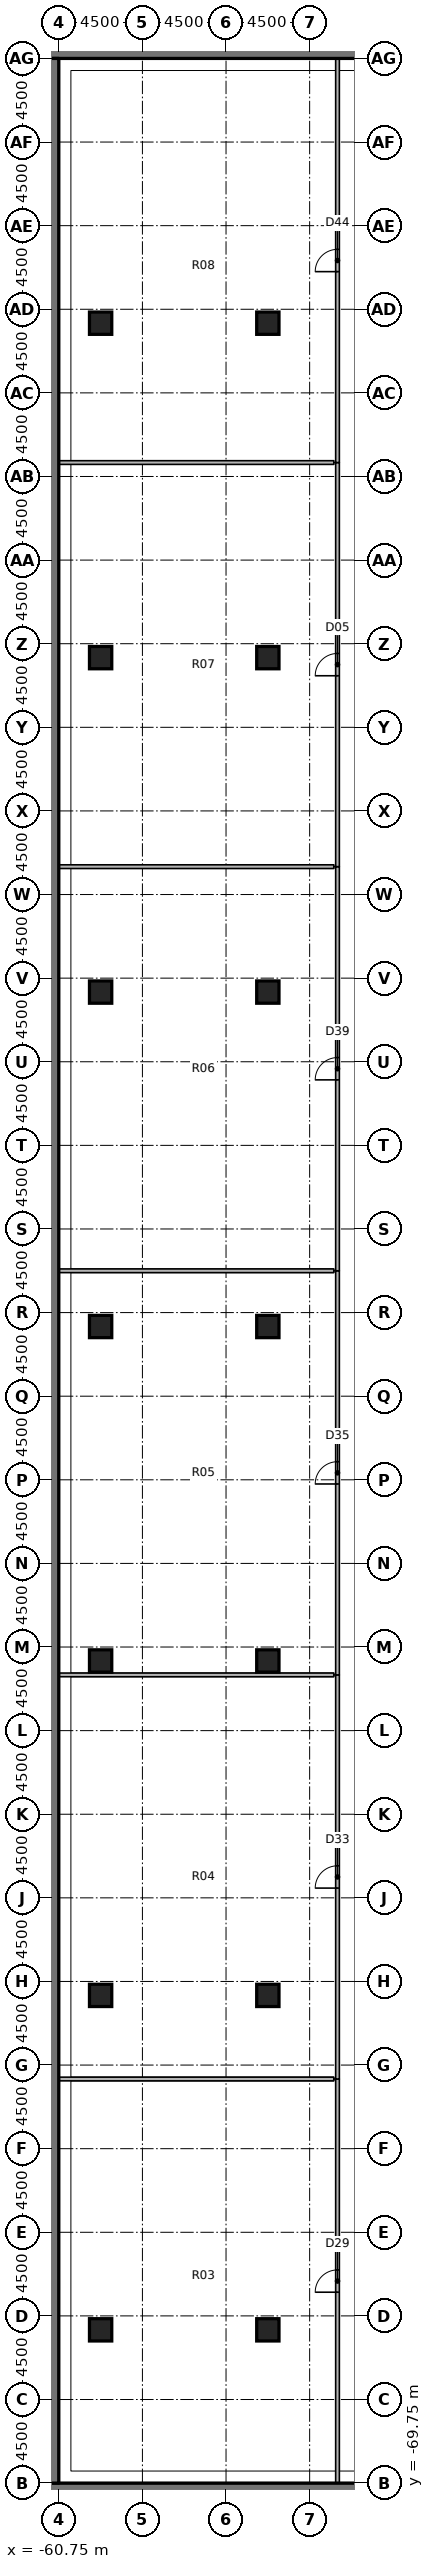
"""IFC4 building model, lengths in metres.
Left out: names, types, materials, properties, quantities, classifications, styles, units other than length and angle.
Written with IfcOpenShell. Run it as: python <this file> out.ifc"""

import sys

from ifc_helpers import new_model, si_unit, direction, frame, frame_2d, origin, origin_2d, place, context, subcontext, project, spatial, rectangle, extrude, element, fill, save


model = new_model("IFC4")
c1 = context("Model", 3, precision=1e-05, world=origin(), true_north=direction((0.0, 1.0)))
c2 = subcontext(c1, "Body", "Model", "MODEL_VIEW")
j1 = project(units=[si_unit("LENGTHUNIT", "METRE"), si_unit("PLANEANGLEUNIT", "RADIAN")], contexts=[c1])
p1 = place(None, origin())
s1 = spatial("IfcSite", under=j1, at=p1, CompositionType="ELEMENT")
p2 = place(p1, origin())
s2 = spatial("IfcBuilding", under=s1, at=p2, CompositionType="ELEMENT")
p3 = place(p2, frame((0.0, 0.0, -4.0)))
s3 = spatial("IfcBuildingStorey", under=s2, at=p3, CompositionType="ELEMENT", Elevation=-4.0)
for number, where, z_axis, x_axis in (
    (1, (-58.5, -61.5, 0.0), (0.0, 0.0, 1.0), (1.0, 0.0, 0.0)),
    (2, (-58.5, -43.5, 0.0), (0.0, 0.0, 1.0), (1.0, 0.0, 0.0)),
    (3, (-58.5, -25.5, 0.0), (0.0, 0.0, 1.0), (1.0, 0.0, 0.0)),
    (4, (-58.5, -7.5, 0.0), (0.0, 0.0, 1.0), (1.0, 0.0, 0.0)),
    (5, (-58.5, 10.5, 0.0), (0.0, 0.0, 1.0), (1.0, 0.0, 0.0)),
    (6, (-58.5, 28.5, 0.0), (0.0, 0.0, 1.0), (1.0, 0.0, 0.0)),
    (7, (-58.5, 46.5, 0.0), (0.0, 0.0, 1.0), (1.0, 0.0, 0.0)),
    (8, (-49.5, -61.5, 0.0), (0.0, 0.0, 1.0), (1.0, 0.0, 0.0)),
    (9, (-49.5, -43.5, 0.0), (0.0, 0.0, 1.0), (1.0, 0.0, 0.0)),
    (10, (-49.5, -25.5, 0.0), (0.0, 0.0, 1.0), (1.0, 0.0, 0.0)),
    (11, (-49.5, -7.5, 0.0), (0.0, 0.0, 1.0), (1.0, 0.0, 0.0)),
    (12, (-49.5, 10.5, 0.0), (0.0, 0.0, 1.0), (1.0, 0.0, 0.0)),
    (13, (-49.5, 28.5, 0.0), (0.0, 0.0, 1.0), (1.0, 0.0, 0.0)),
    (14, (-49.5, 46.5, 0.0), (0.0, 0.0, 1.0), (1.0, 0.0, 0.0)),
):
    element("IfcColumn", number, at=place(p3, frame(where, z_axis=z_axis, x_axis=x_axis)), inside=s3, PredefinedType="COLUMN", context=c2, shape_type="SweptSolid", body=[
        extrude(rectangle(XDim=1.2, YDim=1.2, at=origin_2d()), origin(), (0.0, 0.0, 1.0), 3.1),
    ])
for number, where, z_axis, x_axis in (
    (15, (-61.25, -70.0, 0.0), (0.0, 0.0, 1.0), (1.0, 0.0, 0.0)),
    (16, (-61.25, 61.0, 0.0), (0.0, 0.0, 1.0), (1.0, 0.0, 0.0)),
):
    element("IfcWall", number, at=place(p3, frame(where, z_axis=z_axis, x_axis=x_axis)), inside=s3, PredefinedType="SOLIDWALL", context=c2, shape_type="SweptSolid", body=[
        extrude(rectangle(XDim=122.5, YDim=0.5, at=frame_2d((61.25, 0.0))), origin(), (0.0, 0.0, 1.0), 4.0),
    ])
p4 = place(p3, frame((-61.0, -69.75, 0.0), z_axis=(0.0, 0.0, 1.0), x_axis=(0.0, 1.0, 0.0)))
e17 = element("IfcWall", 17, at=p4, inside=s3, PredefinedType="SOLIDWALL", context=c2, shape_type="SweptSolid", body=[
    extrude(rectangle(XDim=130.5, YDim=0.5, at=frame_2d((65.25, 0.0))), origin(), (0.0, 0.0, 1.0), 4.0),
])
p5 = place(p3, frame((-45.75, -69.75, 0.0), z_axis=(0.0, 0.0, 1.0), x_axis=(0.0, 1.0, 0.0)))
e18 = element("IfcWall", 18, at=p5, inside=s3, PredefinedType="PARTITIONING", context=c2, shape_type="SweptSolid", body=[
    extrude(rectangle(XDim=21.75, YDim=0.2, at=frame_2d((10.875, 0.0))), origin(), (0.0, 0.0, 1.0), 3.1),
])
p6 = place(p5, frame((10.275, 0.0, 0.0)))
e19 = element("IfcOpeningElement", 19, at=p6, cuts=e18, PredefinedType="OPENING", context=c2, shape_type="SweptSolid", body=[
    extrude(rectangle(XDim=1.2, YDim=2.1, at=frame_2d((0.6, 1.05))), frame((0.0, 0.11, 0.0), z_axis=(0.0, -1.0, 0.0), x_axis=(1.0, 0.0, 0.0)), (0.0, 0.0, 1.0), 0.22),
])
p7 = place(p3, frame((-45.75, -48.0, 0.0), z_axis=(0.0, 0.0, 1.0), x_axis=(0.0, 1.0, 0.0)))
e20 = element("IfcWall", 20, at=p7, inside=s3, PredefinedType="PARTITIONING", context=c2, shape_type="SweptSolid", body=[
    extrude(rectangle(XDim=21.75, YDim=0.2, at=frame_2d((10.875, 0.0))), origin(), (0.0, 0.0, 1.0), 3.1),
])
p8 = place(p7, frame((10.275, 0.0, 0.0)))
e21 = element("IfcOpeningElement", 21, at=p8, cuts=e20, PredefinedType="OPENING", context=c2, shape_type="SweptSolid", body=[
    extrude(rectangle(XDim=1.2, YDim=2.1, at=frame_2d((0.6, 1.05))), frame((0.0, 0.11, 0.0), z_axis=(0.0, -1.0, 0.0), x_axis=(1.0, 0.0, 0.0)), (0.0, 0.0, 1.0), 0.22),
])
p9 = place(p3, frame((-45.75, -26.25, 0.0), z_axis=(0.0, 0.0, 1.0), x_axis=(0.0, 1.0, 0.0)))
e22 = element("IfcWall", 22, at=p9, inside=s3, PredefinedType="PARTITIONING", context=c2, shape_type="SweptSolid", body=[
    extrude(rectangle(XDim=21.75, YDim=0.2, at=frame_2d((10.875, 0.0))), origin(), (0.0, 0.0, 1.0), 3.1),
])
p10 = place(p9, frame((10.275, 0.0, 0.0)))
e23 = element("IfcOpeningElement", 23, at=p10, cuts=e22, PredefinedType="OPENING", context=c2, shape_type="SweptSolid", body=[
    extrude(rectangle(XDim=1.2, YDim=2.1, at=frame_2d((0.6, 1.05))), frame((0.0, 0.11, 0.0), z_axis=(0.0, -1.0, 0.0), x_axis=(1.0, 0.0, 0.0)), (0.0, 0.0, 1.0), 0.22),
])
p11 = place(p3, frame((-45.75, -4.5, 0.0), z_axis=(0.0, 0.0, 1.0), x_axis=(0.0, 1.0, 0.0)))
e24 = element("IfcWall", 24, at=p11, inside=s3, PredefinedType="PARTITIONING", context=c2, shape_type="SweptSolid", body=[
    extrude(rectangle(XDim=21.75, YDim=0.2, at=frame_2d((10.875, 0.0))), origin(), (0.0, 0.0, 1.0), 3.1),
])
p12 = place(p11, frame((10.275, 0.0, 0.0)))
e25 = element("IfcOpeningElement", 25, at=p12, cuts=e24, PredefinedType="OPENING", context=c2, shape_type="SweptSolid", body=[
    extrude(rectangle(XDim=1.2, YDim=2.1, at=frame_2d((0.6, 1.05))), frame((0.0, 0.11, 0.0), z_axis=(0.0, -1.0, 0.0), x_axis=(1.0, 0.0, 0.0)), (0.0, 0.0, 1.0), 0.22),
])
p13 = place(p3, frame((-45.75, 17.25, 0.0), z_axis=(0.0, 0.0, 1.0), x_axis=(0.0, 1.0, 0.0)))
e26 = element("IfcWall", 26, at=p13, inside=s3, PredefinedType="PARTITIONING", context=c2, shape_type="SweptSolid", body=[
    extrude(rectangle(XDim=21.75, YDim=0.2, at=frame_2d((10.875, 0.0))), origin(), (0.0, 0.0, 1.0), 3.1),
])
p14 = place(p13, frame((10.275, 0.0, 0.0)))
e27 = element("IfcOpeningElement", 27, at=p14, cuts=e26, PredefinedType="OPENING", context=c2, shape_type="SweptSolid", body=[
    extrude(rectangle(XDim=1.2, YDim=2.1, at=frame_2d((0.6, 1.05))), frame((0.0, 0.11, 0.0), z_axis=(0.0, -1.0, 0.0), x_axis=(1.0, 0.0, 0.0)), (0.0, 0.0, 1.0), 0.22),
])
p15 = place(p3, frame((-45.75, 39.0, 0.0), z_axis=(0.0, 0.0, 1.0), x_axis=(0.0, 1.0, 0.0)))
e28 = element("IfcWall", 28, at=p15, inside=s3, PredefinedType="PARTITIONING", context=c2, shape_type="SweptSolid", body=[
    extrude(rectangle(XDim=21.75, YDim=0.2, at=frame_2d((10.875, 0.0))), origin(), (0.0, 0.0, 1.0), 3.1),
])
p16 = place(p15, frame((10.275, 0.0, 0.0)))
e29 = element("IfcOpeningElement", 29, at=p16, cuts=e28, PredefinedType="OPENING", context=c2, shape_type="SweptSolid", body=[
    extrude(rectangle(XDim=1.2, YDim=2.1, at=frame_2d((0.6, 1.05))), frame((0.0, 0.11, 0.0), z_axis=(0.0, -1.0, 0.0), x_axis=(1.0, 0.0, 0.0)), (0.0, 0.0, 1.0), 0.22),
])
for number, where, z_axis, x_axis in (
    (30, (-60.75, -48.0, 0.0), (0.0, 0.0, 1.0), (1.0, 0.0, 0.0)),
    (31, (-60.75, -26.25, 0.0), (0.0, 0.0, 1.0), (1.0, 0.0, 0.0)),
    (32, (-60.75, -4.5, 0.0), (0.0, 0.0, 1.0), (1.0, 0.0, 0.0)),
    (33, (-60.75, 17.25, 0.0), (0.0, 0.0, 1.0), (1.0, 0.0, 0.0)),
    (34, (-60.75, 39.0, 0.0), (0.0, 0.0, 1.0), (1.0, 0.0, 0.0)),
):
    element("IfcWall", number, at=place(p3, frame(where, z_axis=z_axis, x_axis=x_axis)), inside=s3, PredefinedType="PARTITIONING", context=c2, shape_type="SweptSolid", body=[
        extrude(rectangle(XDim=14.8, YDim=0.2, at=frame_2d((7.4, 0.0))), origin(), (0.0, 0.0, 1.0), 3.1),
    ])
p17 = place(p6, origin())
e35 = element("IfcDoor", 35, at=p17, inside=s3, OperationType="SINGLE_SWING_LEFT", PredefinedType="DOOR", context=c2, shape_type="SweptSolid", body=[
    extrude(rectangle(XDim=1.2, YDim=2.1, at=frame_2d((0.6, 1.05))), frame((0.0, 0.025, 0.0), z_axis=(0.0, -1.0, 0.0), x_axis=(1.0, 0.0, 0.0)), (0.0, 0.0, 1.0), 0.05),
])
fill(e19, e35)
p18 = place(p8, origin())
e36 = element("IfcDoor", 36, at=p18, inside=s3, OperationType="SINGLE_SWING_LEFT", PredefinedType="DOOR", context=c2, shape_type="SweptSolid", body=[
    extrude(rectangle(XDim=1.2, YDim=2.1, at=frame_2d((0.6, 1.05))), frame((0.0, 0.025, 0.0), z_axis=(0.0, -1.0, 0.0), x_axis=(1.0, 0.0, 0.0)), (0.0, 0.0, 1.0), 0.05),
])
fill(e21, e36)
p19 = place(p10, origin())
e37 = element("IfcDoor", 37, at=p19, inside=s3, OperationType="SINGLE_SWING_LEFT", PredefinedType="DOOR", context=c2, shape_type="SweptSolid", body=[
    extrude(rectangle(XDim=1.2, YDim=2.1, at=frame_2d((0.6, 1.05))), frame((0.0, 0.025, 0.0), z_axis=(0.0, -1.0, 0.0), x_axis=(1.0, 0.0, 0.0)), (0.0, 0.0, 1.0), 0.05),
])
fill(e23, e37)
p20 = place(p12, origin())
e38 = element("IfcDoor", 38, at=p20, inside=s3, OperationType="SINGLE_SWING_LEFT", PredefinedType="DOOR", context=c2, shape_type="SweptSolid", body=[
    extrude(rectangle(XDim=1.2, YDim=2.1, at=frame_2d((0.6, 1.05))), frame((0.0, 0.025, 0.0), z_axis=(0.0, -1.0, 0.0), x_axis=(1.0, 0.0, 0.0)), (0.0, 0.0, 1.0), 0.05),
])
fill(e25, e38)
p21 = place(p14, origin())
e39 = element("IfcDoor", 39, at=p21, inside=s3, OperationType="SINGLE_SWING_LEFT", PredefinedType="DOOR", context=c2, shape_type="SweptSolid", body=[
    extrude(rectangle(XDim=1.2, YDim=2.1, at=frame_2d((0.6, 1.05))), frame((0.0, 0.025, 0.0), z_axis=(0.0, -1.0, 0.0), x_axis=(1.0, 0.0, 0.0)), (0.0, 0.0, 1.0), 0.05),
])
fill(e27, e39)
p22 = place(p16, origin())
e40 = element("IfcDoor", 40, at=p22, inside=s3, OperationType="SINGLE_SWING_LEFT", PredefinedType="DOOR", context=c2, shape_type="SweptSolid", body=[
    extrude(rectangle(XDim=1.2, YDim=2.1, at=frame_2d((0.6, 1.05))), frame((0.0, 0.025, 0.0), z_axis=(0.0, -1.0, 0.0), x_axis=(1.0, 0.0, 0.0)), (0.0, 0.0, 1.0), 0.05),
])
fill(e29, e40)
save(model, sys.argv[1])
